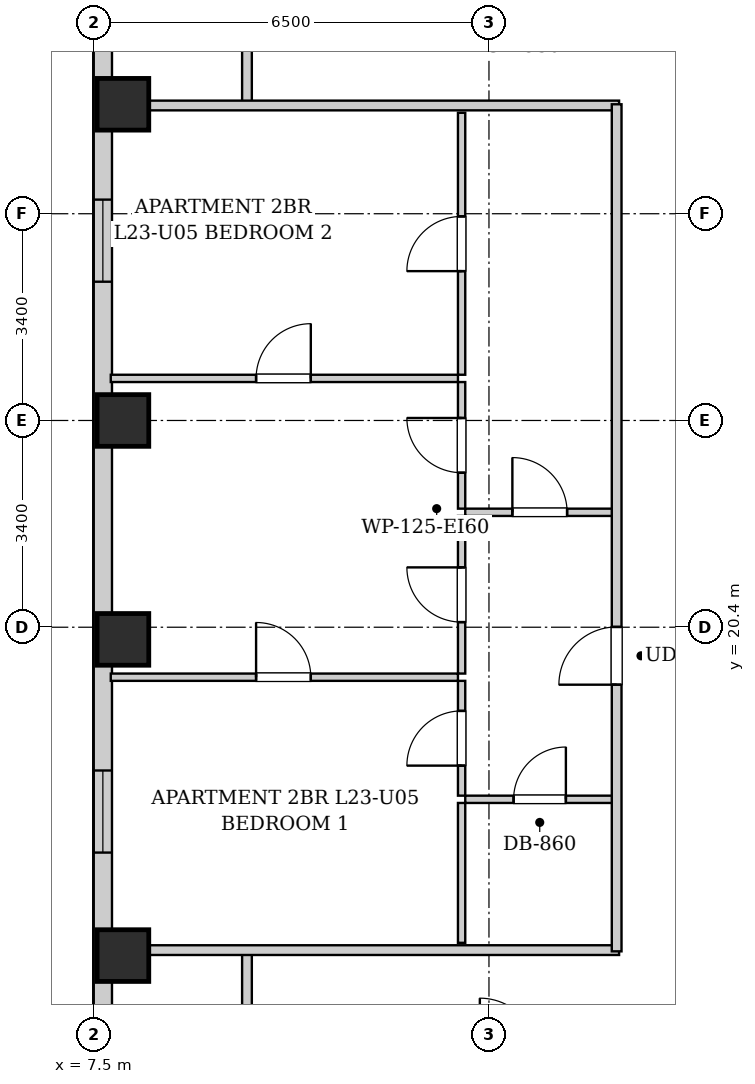
"""IFC4 building model, lengths in metres.
Left out: names, types, materials, properties, quantities, classifications, styles, units other than length and angle.
Written with IfcOpenShell. Run it as: python <this file> out.ifc"""

import sys

from ifc_helpers import new_model, si_unit, direction, frame, frame_2d, origin, origin_2d, place, context, subcontext, project, spatial, rectangle, extrude, element, fill, save


model = new_model("IFC4")
c1 = context("Model", 3, precision=1e-05, world=origin(), true_north=direction((0.0, 1.0)))
c2 = subcontext(c1, "Body", "Model", "MODEL_VIEW")
j1 = project(units=[si_unit("LENGTHUNIT", "METRE"), si_unit("PLANEANGLEUNIT", "RADIAN")], contexts=[c1])
p1 = place(None, origin())
s1 = spatial("IfcSite", under=j1, at=p1, CompositionType="ELEMENT")
p2 = place(p1, origin())
s2 = spatial("IfcBuilding", under=s1, at=p2, CompositionType="ELEMENT")
p3 = place(p2, frame((0.0, 0.0, 84.7)))
s3 = spatial("IfcBuildingStorey", under=s2, at=p3, CompositionType="ELEMENT", Elevation=84.7)
for number, where, z_axis, x_axis in (
    (1, (7.98, 15.0, 0.0), (0.0, 0.0, 1.0), (1.0, 0.0, 0.0)),
    (2, (7.98, 20.2, 0.0), (0.0, 0.0, 1.0), (1.0, 0.0, 0.0)),
    (3, (7.98, 23.8, 0.0), (0.0, 0.0, 1.0), (1.0, 0.0, 0.0)),
    (4, (7.98, 29.0, 0.0), (0.0, 0.0, 1.0), (1.0, 0.0, 0.0)),
):
    element("IfcColumn", number, at=place(p3, frame(where, z_axis=z_axis, x_axis=x_axis)), inside=s3, PredefinedType="COLUMN", context=c2, shape_type="SweptSolid", body=[
        extrude(rectangle(XDim=0.85, YDim=0.85, at=origin_2d()), origin(), (0.0, 0.0, 1.0), 3.2),
    ])
p4 = place(p3, frame((7.65, 2.5, 0.0), z_axis=(0.0, 0.0, 1.0), x_axis=(0.0, 1.0, 0.0)))
e5 = element("IfcWall", 5, at=p4, inside=s3, PredefinedType="SOLIDWALL", context=c2, shape_type="SweptSolid", body=[
    extrude(rectangle(XDim=38.3, YDim=0.3, at=frame_2d((19.15, 0.0))), origin(), (0.0, 0.0, 1.0), 2.94),
])
p5 = place(p4, frame((3.38, 0.0, 0.55)))
e6 = element("IfcOpeningElement", 6, at=p5, cuts=e5, PredefinedType="OPENING", context=c2, shape_type="SweptSolid", body=[
    extrude(rectangle(XDim=1.35, YDim=1.2, at=frame_2d((0.675, 0.6))), frame((0.0, 0.16, 0.0), z_axis=(0.0, -1.0, 0.0), x_axis=(1.0, 0.0, 0.0)), (0.0, 0.0, 1.0), 0.32),
])
p6 = place(p4, frame((1.135, 0.0, 0.55)))
e7 = element("IfcOpeningElement", 7, at=p6, cuts=e5, PredefinedType="OPENING", context=c2, shape_type="SweptSolid", body=[
    extrude(rectangle(XDim=1.35, YDim=1.2, at=frame_2d((0.675, 0.6))), frame((0.0, 0.16, 0.0), z_axis=(0.0, -1.0, 0.0), x_axis=(1.0, 0.0, 0.0)), (0.0, 0.0, 1.0), 0.32),
])
p7 = place(p4, frame((33.946, 0.0, 0.55)))
e8 = element("IfcOpeningElement", 8, at=p7, cuts=e5, PredefinedType="OPENING", context=c2, shape_type="SweptSolid", body=[
    extrude(rectangle(XDim=1.35, YDim=1.2, at=frame_2d((0.675, 0.6))), frame((0.0, 0.16, 0.0), z_axis=(0.0, -1.0, 0.0), x_axis=(1.0, 0.0, 0.0)), (0.0, 0.0, 1.0), 0.32),
])
p8 = place(p4, frame((32.085, 0.0, 0.55)))
e9 = element("IfcOpeningElement", 9, at=p8, cuts=e5, PredefinedType="OPENING", context=c2, shape_type="SweptSolid", body=[
    extrude(rectangle(XDim=1.35, YDim=1.2, at=frame_2d((0.675, 0.6))), frame((0.0, 0.16, 0.0), z_axis=(0.0, -1.0, 0.0), x_axis=(1.0, 0.0, 0.0)), (0.0, 0.0, 1.0), 0.32),
])
p9 = place(p4, frame((14.194, 0.0, 0.55)))
e10 = element("IfcOpeningElement", 10, at=p9, cuts=e5, PredefinedType="OPENING", context=c2, shape_type="SweptSolid", body=[
    extrude(rectangle(XDim=1.35, YDim=1.2, at=frame_2d((0.675, 0.6))), frame((0.0, 0.16, 0.0), z_axis=(0.0, -1.0, 0.0), x_axis=(1.0, 0.0, 0.0)), (0.0, 0.0, 1.0), 0.32),
])
p10 = place(p4, frame((23.582, 0.0, 0.55)))
e11 = element("IfcOpeningElement", 11, at=p10, cuts=e5, PredefinedType="OPENING", context=c2, shape_type="SweptSolid", body=[
    extrude(rectangle(XDim=1.35, YDim=1.2, at=frame_2d((0.675, 0.6))), frame((0.0, 0.16, 0.0), z_axis=(0.0, -1.0, 0.0), x_axis=(1.0, 0.0, 0.0)), (0.0, 0.0, 1.0), 0.32),
])
for number, where, z_axis, x_axis in (
    (12, (10.02, 13.35, 0.0), (0.0, 0.0, 1.0), (0.0, 1.0, 0.0)),
    (13, (10.02, 28.98, 0.0), (0.0, 0.0, 1.0), (0.0, 1.0, 0.0)),
):
    element("IfcWall", number, at=place(p3, frame(where, z_axis=z_axis, x_axis=x_axis)), inside=s3, PredefinedType="PARTITIONING", context=c2, shape_type="SweptSolid", body=[
        extrude(rectangle(XDim=1.74, YDim=0.16, at=frame_2d((0.87, 0.0))), origin(), (0.0, 0.0, 1.0), 2.94),
    ])
for number, where, z_axis, x_axis in (
    (14, (7.78, 15.09, 0.0), (0.0, 0.0, 1.0), (1.0, 0.0, 0.0)),
    (15, (7.78, 28.98, 0.0), (0.0, 0.0, 1.0), (1.0, 0.0, 0.0)),
):
    element("IfcWall", number, at=place(p3, frame(where, z_axis=z_axis, x_axis=x_axis)), inside=s3, PredefinedType="PARTITIONING", context=c2, shape_type="SweptSolid", body=[
        extrude(rectangle(XDim=8.36, YDim=0.16, at=frame_2d((4.18, 0.0))), origin(), (0.0, 0.0, 1.0), 2.309),
    ])
p11 = place(p3, frame((13.61, 22.29, 0.0), z_axis=(0.0, 0.0, 1.0), x_axis=(1.0, 0.0, 0.0)))
e16 = element("IfcWall", 16, at=p11, inside=s3, PredefinedType="PARTITIONING", context=c2, shape_type="SweptSolid", body=[
    extrude(rectangle(XDim=2.45, YDim=0.12, at=frame_2d((1.225, 0.0))), origin(), (0.0, 0.0, 1.0), 2.94),
])
p12 = place(p11, frame((0.775, 0.0, 0.0)))
e17 = element("IfcOpeningElement", 17, at=p12, cuts=e16, PredefinedType="OPENING", context=c2, shape_type="SweptSolid", body=[
    extrude(rectangle(XDim=0.9, YDim=2.05, at=frame_2d((0.45, 1.025))), frame((0.0, 0.07, 0.0), z_axis=(0.0, -1.0, 0.0), x_axis=(1.0, 0.0, 0.0)), (0.0, 0.0, 1.0), 0.14),
])
p13 = place(p3, frame((13.55, 22.35, 0.0), z_axis=(0.0, 0.0, 1.0), x_axis=(0.0, 1.0, 0.0)))
e18 = element("IfcWall", 18, at=p13, inside=s3, PredefinedType="PARTITIONING", context=c2, shape_type="SweptSolid", body=[
    extrude(rectangle(XDim=2.082, YDim=0.12, at=frame_2d((1.041, 0.0))), origin(), (0.0, 0.0, 1.0), 2.94),
])
p14 = place(p13, frame((0.591, 0.0, 0.0)))
e19 = element("IfcOpeningElement", 19, at=p14, cuts=e18, PredefinedType="OPENING", context=c2, shape_type="SweptSolid", body=[
    extrude(rectangle(XDim=0.9, YDim=2.05, at=frame_2d((0.45, 1.025))), frame((0.0, 0.07, 0.0), z_axis=(0.0, -1.0, 0.0), x_axis=(1.0, 0.0, 0.0)), (0.0, 0.0, 1.0), 0.14),
])
p15 = place(p3, frame((13.55, 24.552, 0.0), z_axis=(0.0, 0.0, 1.0), x_axis=(0.0, 1.0, 0.0)))
e20 = element("IfcWall", 20, at=p15, inside=s3, PredefinedType="PARTITIONING", context=c2, shape_type="SweptSolid", body=[
    extrude(rectangle(XDim=4.308, YDim=0.12, at=frame_2d((2.154, 0.0))), origin(), (0.0, 0.0, 1.0), 2.94),
])
p16 = place(p15, frame((1.704, 0.0, 0.0)))
e21 = element("IfcOpeningElement", 21, at=p16, cuts=e20, PredefinedType="OPENING", context=c2, shape_type="SweptSolid", body=[
    extrude(rectangle(XDim=0.9, YDim=2.05, at=frame_2d((0.45, 1.025))), frame((0.0, 0.07, 0.0), z_axis=(0.0, -1.0, 0.0), x_axis=(1.0, 0.0, 0.0)), (0.0, 0.0, 1.0), 0.14),
])
p17 = place(p3, frame((13.61, 17.57, 0.0), z_axis=(0.0, 0.0, 1.0), x_axis=(1.0, 0.0, 0.0)))
e22 = element("IfcWall", 22, at=p17, inside=s3, PredefinedType="PARTITIONING", context=c2, shape_type="SweptSolid", body=[
    extrude(rectangle(XDim=2.45, YDim=0.12, at=frame_2d((1.225, 0.0))), origin(), (0.0, 0.0, 1.0), 2.94),
])
p18 = place(p17, frame((0.795, 0.0, 0.0)))
e23 = element("IfcOpeningElement", 23, at=p18, cuts=e22, PredefinedType="OPENING", context=c2, shape_type="SweptSolid", body=[
    extrude(rectangle(XDim=0.86, YDim=2.05, at=frame_2d((0.43, 1.025))), frame((0.0, 0.07, 0.0), z_axis=(0.0, -1.0, 0.0), x_axis=(1.0, 0.0, 0.0)), (0.0, 0.0, 1.0), 0.14),
])
p19 = place(p3, frame((13.55, 15.21, 0.0), z_axis=(0.0, 0.0, 1.0), x_axis=(0.0, 1.0, 0.0)))
e24 = element("IfcWall", 24, at=p19, inside=s3, PredefinedType="PARTITIONING", context=c2, shape_type="SweptSolid", body=[
    extrude(rectangle(XDim=2.3, YDim=0.12, at=frame_2d((1.15, 0.0))), origin(), (0.0, 0.0, 1.0), 2.94),
])
p20 = place(p3, frame((13.55, 17.63, 0.0), z_axis=(0.0, 0.0, 1.0), x_axis=(0.0, 1.0, 0.0)))
e25 = element("IfcWall", 25, at=p20, inside=s3, PredefinedType="PARTITIONING", context=c2, shape_type="SweptSolid", body=[
    extrude(rectangle(XDim=1.888, YDim=0.12, at=frame_2d((0.944, 0.0))), origin(), (0.0, 0.0, 1.0), 2.94),
])
p21 = place(p20, frame((0.494, 0.0, 0.0)))
e26 = element("IfcOpeningElement", 26, at=p21, cuts=e25, PredefinedType="OPENING", context=c2, shape_type="SweptSolid", body=[
    extrude(rectangle(XDim=0.9, YDim=2.05, at=frame_2d((0.45, 1.025))), frame((0.0, 0.07, 0.0), z_axis=(0.0, -1.0, 0.0), x_axis=(1.0, 0.0, 0.0)), (0.0, 0.0, 1.0), 0.14),
])
p22 = place(p3, frame((13.55, 19.638, 0.0), z_axis=(0.0, 0.0, 1.0), x_axis=(0.0, 1.0, 0.0)))
e27 = element("IfcWall", 27, at=p22, inside=s3, PredefinedType="PARTITIONING", context=c2, shape_type="SweptSolid", body=[
    extrude(rectangle(XDim=2.592, YDim=0.12, at=frame_2d((1.296, 0.0))), origin(), (0.0, 0.0, 1.0), 2.94),
])
p23 = place(p22, frame((0.846, 0.0, 0.0)))
e28 = element("IfcOpeningElement", 28, at=p23, cuts=e27, PredefinedType="OPENING", context=c2, shape_type="SweptSolid", body=[
    extrude(rectangle(XDim=0.9, YDim=2.05, at=frame_2d((0.45, 1.025))), frame((0.0, 0.07, 0.0), z_axis=(0.0, -1.0, 0.0), x_axis=(1.0, 0.0, 0.0)), (0.0, 0.0, 1.0), 0.14),
])
p24 = place(p3, frame((7.78, 19.578, 0.0), z_axis=(0.0, 0.0, 1.0), x_axis=(1.0, 0.0, 0.0)))
e29 = element("IfcWall", 29, at=p24, inside=s3, PredefinedType="PARTITIONING", context=c2, shape_type="SweptSolid", body=[
    extrude(rectangle(XDim=5.71, YDim=0.12, at=frame_2d((2.855, 0.0))), origin(), (0.0, 0.0, 1.0), 2.94),
])
p25 = place(p24, frame((2.39, 0.0, 0.0)))
e30 = element("IfcOpeningElement", 30, at=p25, cuts=e29, PredefinedType="OPENING", context=c2, shape_type="SweptSolid", body=[
    extrude(rectangle(XDim=0.9, YDim=2.05, at=frame_2d((0.45, 1.025))), frame((0.0, 0.07, 0.0), z_axis=(0.0, -1.0, 0.0), x_axis=(1.0, 0.0, 0.0)), (0.0, 0.0, 1.0), 0.14),
])
p26 = place(p3, frame((7.78, 24.492, 0.0), z_axis=(0.0, 0.0, 1.0), x_axis=(1.0, 0.0, 0.0)))
e31 = element("IfcWall", 31, at=p26, inside=s3, PredefinedType="PARTITIONING", context=c2, shape_type="SweptSolid", body=[
    extrude(rectangle(XDim=5.71, YDim=0.12, at=frame_2d((2.855, 0.0))), origin(), (0.0, 0.0, 1.0), 2.518),
])
p27 = place(p26, frame((2.39, 0.0, 0.0)))
e32 = element("IfcOpeningElement", 32, at=p27, cuts=e31, PredefinedType="OPENING", context=c2, shape_type="SweptSolid", body=[
    extrude(rectangle(XDim=0.9, YDim=2.05, at=frame_2d((0.45, 1.025))), frame((0.0, 0.07, 0.0), z_axis=(0.0, -1.0, 0.0), x_axis=(1.0, 0.0, 0.0)), (0.0, 0.0, 1.0), 0.14),
])
p28 = place(p3, frame((16.1, 15.07, 0.0), z_axis=(0.0, 0.0, 1.0), x_axis=(0.0, 1.0, 0.0)))
e33 = element("IfcWall", 33, at=p28, inside=s3, PredefinedType="PARTITIONING", context=c2, shape_type="SweptSolid", body=[
    extrude(rectangle(XDim=13.93, YDim=0.16, at=frame_2d((6.965, 0.0))), origin(), (0.0, 0.0, 1.0), 2.94),
])
p29 = place(p28, frame((4.385, 0.0, 0.0)))
e34 = element("IfcOpeningElement", 34, at=p29, cuts=e33, PredefinedType="OPENING", context=c2, shape_type="SweptSolid", body=[
    extrude(rectangle(XDim=0.95, YDim=2.1, at=frame_2d((0.475, 1.05))), frame((0.0, 0.09, 0.0), z_axis=(0.0, -1.0, 0.0), x_axis=(1.0, 0.0, 0.0)), (0.0, 0.0, 1.0), 0.18),
])
p30 = place(p12, origin())
e35 = element("IfcDoor", 35, at=p30, inside=s3, OperationType="SINGLE_SWING_LEFT", PredefinedType="DOOR", context=c2, shape_type="SweptSolid", body=[
    extrude(rectangle(XDim=0.9, YDim=2.05, at=frame_2d((0.45, 1.025))), frame((0.0, 0.025, 0.0), z_axis=(0.0, -1.0, 0.0), x_axis=(1.0, 0.0, 0.0)), (0.0, 0.0, 1.0), 0.05),
])
fill(e17, e35)
p31 = place(p14, origin())
e36 = element("IfcDoor", 36, at=p31, inside=s3, OperationType="SINGLE_SWING_RIGHT", PredefinedType="DOOR", context=c2, shape_type="SweptSolid", body=[
    extrude(rectangle(XDim=0.9, YDim=2.05, at=frame_2d((0.45, 1.025))), frame((0.0, 0.025, 0.0), z_axis=(0.0, -1.0, 0.0), x_axis=(1.0, 0.0, 0.0)), (0.0, 0.0, 1.0), 0.05),
])
fill(e19, e36)
p32 = place(p16, origin())
e37 = element("IfcDoor", 37, at=p32, inside=s3, OperationType="SINGLE_SWING_LEFT", PredefinedType="DOOR", context=c2, shape_type="SweptSolid", body=[
    extrude(rectangle(XDim=0.9, YDim=2.05, at=frame_2d((0.45, 1.025))), frame((0.0, 0.025, 0.0), z_axis=(0.0, -1.0, 0.0), x_axis=(1.0, 0.0, 0.0)), (0.0, 0.0, 1.0), 0.05),
])
fill(e21, e37)
p33 = place(p18, origin())
e38 = element("IfcDoor", 38, at=p33, inside=s3, OperationType="SINGLE_SWING_RIGHT", PredefinedType="DOOR", context=c2, shape_type="SweptSolid", body=[
    extrude(rectangle(XDim=0.86, YDim=2.05, at=frame_2d((0.43, 1.025))), frame((0.0, 0.025, 0.0), z_axis=(0.0, -1.0, 0.0), x_axis=(1.0, 0.0, 0.0)), (0.0, 0.0, 1.0), 0.05),
])
fill(e23, e38)
p34 = place(p21, origin())
e39 = element("IfcDoor", 39, at=p34, inside=s3, OperationType="SINGLE_SWING_LEFT", PredefinedType="DOOR", context=c2, shape_type="SweptSolid", body=[
    extrude(rectangle(XDim=0.9, YDim=2.05, at=frame_2d((0.45, 1.025))), frame((0.0, 0.025, 0.0), z_axis=(0.0, -1.0, 0.0), x_axis=(1.0, 0.0, 0.0)), (0.0, 0.0, 1.0), 0.05),
])
fill(e26, e39)
p35 = place(p23, origin())
e40 = element("IfcDoor", 40, at=p35, inside=s3, OperationType="SINGLE_SWING_RIGHT", PredefinedType="DOOR", context=c2, shape_type="SweptSolid", body=[
    extrude(rectangle(XDim=0.9, YDim=2.05, at=frame_2d((0.45, 1.025))), frame((0.0, 0.025, 0.0), z_axis=(0.0, -1.0, 0.0), x_axis=(1.0, 0.0, 0.0)), (0.0, 0.0, 1.0), 0.05),
])
fill(e28, e40)
p36 = place(p25, origin())
e41 = element("IfcDoor", 41, at=p36, inside=s3, OperationType="SINGLE_SWING_LEFT", PredefinedType="DOOR", context=c2, shape_type="SweptSolid", body=[
    extrude(rectangle(XDim=0.9, YDim=2.05, at=frame_2d((0.45, 1.025))), frame((0.0, 0.025, 0.0), z_axis=(0.0, -1.0, 0.0), x_axis=(1.0, 0.0, 0.0)), (0.0, 0.0, 1.0), 0.05),
])
fill(e30, e41)
p37 = place(p27, origin())
e42 = element("IfcDoor", 42, at=p37, inside=s3, OperationType="SINGLE_SWING_RIGHT", PredefinedType="DOOR", context=c2, shape_type="SweptSolid", body=[
    extrude(rectangle(XDim=0.9, YDim=2.05, at=frame_2d((0.45, 1.025))), frame((0.0, 0.025, 0.0), z_axis=(0.0, -1.0, 0.0), x_axis=(1.0, 0.0, 0.0)), (0.0, 0.0, 1.0), 0.05),
])
fill(e32, e42)
p38 = place(p29, origin())
e43 = element("IfcDoor", 43, at=p38, inside=s3, OperationType="SINGLE_SWING_LEFT", PredefinedType="DOOR", context=c2, shape_type="SweptSolid", body=[
    extrude(rectangle(XDim=0.95, YDim=2.1, at=frame_2d((0.475, 1.05))), frame((0.0, 0.025, 0.0), z_axis=(0.0, -1.0, 0.0), x_axis=(1.0, 0.0, 0.0)), (0.0, 0.0, 1.0), 0.05),
])
fill(e34, e43)
p39 = place(p9, origin())
e44 = element("IfcWindow", 44, at=p39, inside=s3, PartitioningType="SINGLE_PANEL", PredefinedType="WINDOW", context=c2, shape_type="SweptSolid", body=[
    extrude(rectangle(XDim=1.35, YDim=1.2, at=frame_2d((0.675, 0.6))), frame((0.0, 0.03, 0.0), z_axis=(0.0, -1.0, 0.0), x_axis=(1.0, 0.0, 0.0)), (0.0, 0.0, 1.0), 0.06),
])
fill(e10, e44)
p40 = place(p10, origin())
e45 = element("IfcWindow", 45, at=p40, inside=s3, PartitioningType="SINGLE_PANEL", PredefinedType="WINDOW", context=c2, shape_type="SweptSolid", body=[
    extrude(rectangle(XDim=1.35, YDim=1.2, at=frame_2d((0.675, 0.6))), frame((0.0, 0.03, 0.0), z_axis=(0.0, -1.0, 0.0), x_axis=(1.0, 0.0, 0.0)), (0.0, 0.0, 1.0), 0.06),
])
fill(e11, e45)
save(model, sys.argv[1])
